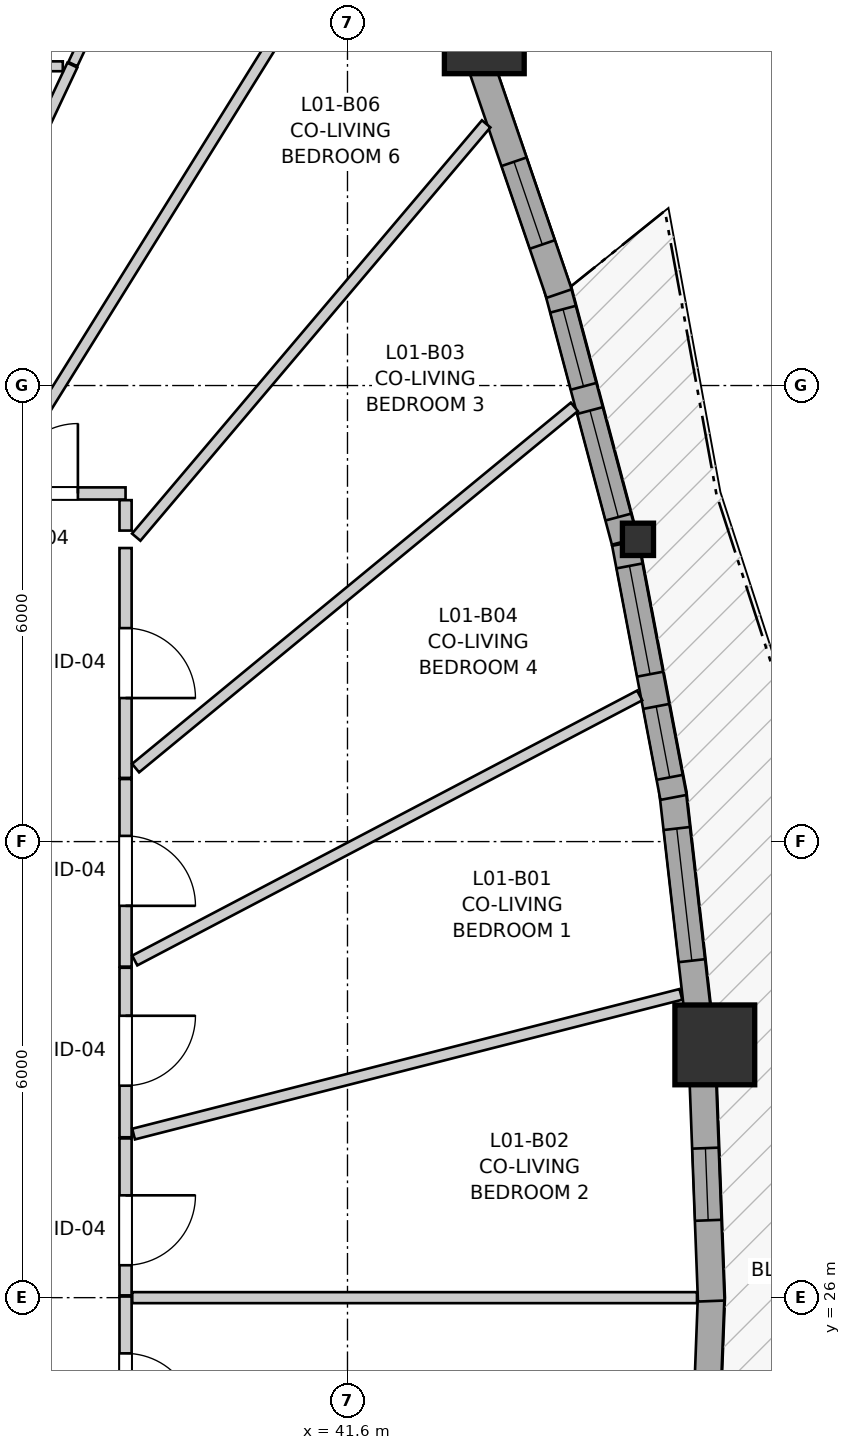
"""IFC4 building model, lengths in metres.
Left out: names, types, materials, properties, quantities, classifications, styles, units other than length and angle.
Written with IfcOpenShell. Run it as: python <this file> out.ifc"""

import sys

from ifc_helpers import new_model, si_unit, direction, frame, frame_2d, origin, origin_2d, place, context, subcontext, project, spatial, rectangle, i_section, extrude, source, transform, mapped, element, fill, save


model = new_model("IFC4")
c1 = context("Model", 3, precision=1e-05, world=origin(), true_north=direction((0.0, 1.0)))
c2 = subcontext(c1, "Body", "Model", "MODEL_VIEW")
j1 = project(units=[si_unit("LENGTHUNIT", "METRE"), si_unit("PLANEANGLEUNIT", "RADIAN")], contexts=[c1])
p1 = place(None, origin())
s1 = spatial("IfcSite", under=j1, at=p1, CompositionType="ELEMENT")
p2 = place(p1, origin())
s2 = spatial("IfcBuilding", under=s1, at=p2, CompositionType="ELEMENT")
p3 = place(p2, frame((0.0, 0.0, 7.8)))
s3 = spatial("IfcBuildingStorey", under=s2, at=p3, CompositionType="ELEMENT", Elevation=7.8)
m1 = source(origin(), c2, "Body", "SweptSolid", [
    extrude(rectangle(XDim=1.05, YDim=1.05, at=origin_2d()), origin(), (0.0, 0.0, 1.0), 2.94),
])
p4 = place(p3, frame((46.433, 29.325, 0.0), z_axis=(0.0, 0.0, 1.0), x_axis=(1.0, 0.0, 0.0)))
e1 = element("IfcColumn", 1, at=p4, inside=s3, PredefinedType="COLUMN", context=c2, shape_type="MappedRepresentation", body=[
    mapped(m1, transform((0.0, 0.0, 0.0), x_axis=(1.0, 0.0, 0.0), y_axis=(0.0, 1.0, 0.0), z_axis=(0.0, 0.0, 1.0), scale=1.0)),
])
m2 = source(origin(), c2, "Body", "SweptSolid", [
    extrude(i_section(OverallWidth=0.409, OverallDepth=0.425, WebThickness=0.03, FlangeThickness=0.048, FilletRadius=0.015, at=origin_2d()), origin(), (0.0, 0.0, 1.0), 2.94),
])
p5 = place(p3, frame((45.422, 35.977, 0.0), z_axis=(0.0, 0.0, 1.0), x_axis=(1.0, 0.0, 0.0)))
e2 = element("IfcColumn", 2, at=p5, inside=s3, PredefinedType="PILASTER", context=c2, shape_type="MappedRepresentation", body=[
    mapped(m2, transform((0.0, 0.0, 0.0), x_axis=(1.0, 0.0, 0.0), y_axis=(0.0, 1.0, 0.0), z_axis=(0.0, 0.0, 1.0), scale=1.0)),
])
p6 = place(p3, frame((43.4, 42.628, 0.0), z_axis=(0.0, 0.0, 1.0), x_axis=(1.0, 0.0, 0.0)))
e3 = element("IfcColumn", 3, at=p6, inside=s3, PredefinedType="COLUMN", context=c2, shape_type="MappedRepresentation", body=[
    mapped(m1, transform((0.0, 0.0, 0.0), x_axis=(1.0, 0.0, 0.0), y_axis=(0.0, 1.0, 0.0), z_axis=(0.0, 0.0, 1.0), scale=1.0)),
])
p7 = place(p3, frame((46.259, 22.701, 0.0), z_axis=(0.0, 0.0, 1.0), x_axis=(0.038015581842, 0.99927714651, 0.0)))
e4 = element("IfcWall", 4, at=p7, inside=s3, PredefinedType="SOLIDWALL", context=c2, shape_type="SweptSolid", body=[
    extrude(rectangle(XDim=3.346, YDim=0.35, at=frame_2d((1.673, 0.0))), origin(), (0.0, 0.0, 1.0), 2.42),
])
p8 = place(p7, frame((1.038, 0.0, 0.82)))
e5 = element("IfcOpeningElement", 5, at=p8, cuts=e4, PredefinedType="OPENING", context=c2, shape_type="SweptSolid", body=[
    extrude(rectangle(XDim=1.25, YDim=1.35, at=frame_2d((0.625, 0.675))), frame((0.0, 0.185, 0.0), z_axis=(0.0, -1.0, 0.0), x_axis=(1.0, 0.0, 0.0)), (0.0, 0.0, 1.0), 0.37),
])
p9 = place(p3, frame((46.386, 25.955, 0.0), z_axis=(0.0, 0.0, 1.0), x_axis=(-0.038063081658, 0.99927533834, 0.0)))
e6 = element("IfcWall", 6, at=p9, inside=s3, PredefinedType="SOLIDWALL", context=c2, shape_type="SweptSolid", body=[
    extrude(rectangle(XDim=3.066, YDim=0.35, at=frame_2d((1.533, 0.0))), origin(), (0.0, 0.0, 1.0), 2.42),
])
p10 = place(p9, frame((1.063, 0.0, 0.82)))
e7 = element("IfcOpeningElement", 7, at=p10, cuts=e6, PredefinedType="OPENING", context=c2, shape_type="SweptSolid", body=[
    extrude(rectangle(XDim=0.95, YDim=1.35, at=frame_2d((0.475, 0.675))), frame((0.0, 0.185, 0.0), z_axis=(0.0, -1.0, 0.0), x_axis=(1.0, 0.0, 0.0)), (0.0, 0.0, 1.0), 0.37),
])
p11 = place(p3, frame((46.225, 29.604, 0.0), z_axis=(0.0, 0.0, 1.0), x_axis=(-0.113323399269, 0.993558154905, 0.0)))
e8 = element("IfcWall", 8, at=p11, inside=s3, PredefinedType="SOLIDWALL", context=c2, shape_type="SweptSolid", body=[
    extrude(rectangle(XDim=3.085, YDim=0.35, at=frame_2d((1.542, 0.0))), origin(), (0.0, 0.0, 1.0), 2.42),
])
p12 = place(p11, frame((0.835, 0.0, 0.82)))
e9 = element("IfcOpeningElement", 9, at=p12, cuts=e8, PredefinedType="OPENING", context=c2, shape_type="SweptSolid", body=[
    extrude(rectangle(XDim=1.75, YDim=1.3, at=frame_2d((0.875, 0.65))), frame((0.0, 0.185, 0.0), z_axis=(0.0, -1.0, 0.0), x_axis=(1.0, 0.0, 0.0)), (0.0, 0.0, 1.0), 0.37),
])
p13 = place(p3, frame((45.889, 32.581, 0.0), z_axis=(0.0, 0.0, 1.0), x_axis=(-0.186670339622, 0.98242260983, 0.0)))
e10 = element("IfcWall", 10, at=p13, inside=s3, PredefinedType="SOLIDWALL", context=c2, shape_type="SweptSolid", body=[
    extrude(rectangle(XDim=3.403, YDim=0.35, at=frame_2d((1.702, 0.0))), origin(), (0.0, 0.0, 1.0), 2.42),
])
p14 = place(p13, frame((0.269, 0.0, 0.82)))
e11 = element("IfcOpeningElement", 11, at=p14, cuts=e10, PredefinedType="OPENING", context=c2, shape_type="SweptSolid", body=[
    extrude(rectangle(XDim=0.95, YDim=1.35, at=frame_2d((0.475, 0.675))), frame((0.0, 0.185, 0.0), z_axis=(0.0, -1.0, 0.0), x_axis=(1.0, 0.0, 0.0)), (0.0, 0.0, 1.0), 0.37),
])
p15 = place(p13, frame((1.65, 0.0, 0.82)))
e12 = element("IfcOpeningElement", 12, at=p15, cuts=e10, PredefinedType="OPENING", context=c2, shape_type="SweptSolid", body=[
    extrude(rectangle(XDim=1.45, YDim=1.25, at=frame_2d((0.725, 0.625))), frame((0.0, 0.185, 0.0), z_axis=(0.0, -1.0, 0.0), x_axis=(1.0, 0.0, 0.0)), (0.0, 0.0, 1.0), 0.37),
])
p16 = place(p3, frame((45.248, 35.951, 0.0), z_axis=(0.0, 0.0, 1.0), x_axis=(-0.25703883136, 0.966401075731, 0.0)))
e13 = element("IfcWall", 13, at=p16, inside=s3, PredefinedType="SOLIDWALL", context=c2, shape_type="SweptSolid", body=[
    extrude(rectangle(XDim=3.459, YDim=0.35, at=frame_2d((1.729, 0.0))), origin(), (0.0, 0.0, 1.0), 2.42),
])
p17 = place(p16, frame((0.329, 0.0, 0.82)))
e14 = element("IfcOpeningElement", 14, at=p17, cuts=e13, PredefinedType="OPENING", context=c2, shape_type="SweptSolid", body=[
    extrude(rectangle(XDim=1.45, YDim=1.25, at=frame_2d((0.725, 0.625))), frame((0.0, 0.185, 0.0), z_axis=(0.0, -1.0, 0.0), x_axis=(1.0, 0.0, 0.0)), (0.0, 0.0, 1.0), 0.37),
])
p18 = place(p16, frame((2.109, 0.0, 0.82)))
e15 = element("IfcOpeningElement", 15, at=p18, cuts=e13, PredefinedType="OPENING", context=c2, shape_type="SweptSolid", body=[
    extrude(rectangle(XDim=1.05, YDim=1.45, at=frame_2d((0.525, 0.725))), frame((0.0, 0.185, 0.0), z_axis=(0.0, -1.0, 0.0), x_axis=(1.0, 0.0, 0.0)), (0.0, 0.0, 1.0), 0.37),
])
p19 = place(p3, frame((44.384, 39.21, 0.0), z_axis=(0.0, 0.0, 1.0), x_axis=(-0.323604561993, 0.946192415663, 0.0)))
e16 = element("IfcWall", 16, at=p19, inside=s3, PredefinedType="SOLIDWALL", context=c2, shape_type="SweptSolid", body=[
    extrude(rectangle(XDim=3.252, YDim=0.35, at=frame_2d((1.626, 0.0))), origin(), (0.0, 0.0, 1.0), 2.42),
])
p20 = place(p19, frame((0.683, 0.0, 0.82)))
e17 = element("IfcOpeningElement", 17, at=p20, cuts=e16, PredefinedType="OPENING", context=c2, shape_type="SweptSolid", body=[
    extrude(rectangle(XDim=1.15, YDim=1.2, at=frame_2d((0.575, 0.6))), frame((0.0, 0.185, 0.0), z_axis=(0.0, -1.0, 0.0), x_axis=(1.0, 0.0, 0.0)), (0.0, 0.0, 1.0), 0.37),
])
p21 = place(p3, frame((38.68, 35.862, 0.0), z_axis=(0.0, 0.0, 1.0), x_axis=(0.0, -1.0, 0.0)))
e18 = element("IfcWall", 18, at=p21, inside=s3, PredefinedType="PARTITIONING", context=c2, shape_type="SweptSolid", body=[
    extrude(rectangle(XDim=3.024, YDim=0.16, at=frame_2d((1.512, 0.0))), origin(), (0.0, 0.0, 1.0), 2.94),
])
p22 = place(p21, frame((1.053, 0.0, 0.0)))
e19 = element("IfcOpeningElement", 19, at=p22, cuts=e18, PredefinedType="OPENING", context=c2, shape_type="SweptSolid", body=[
    extrude(rectangle(XDim=0.92, YDim=2.1, at=frame_2d((0.46, 1.05))), frame((0.0, 0.09, 0.0), z_axis=(0.0, -1.0, 0.0), x_axis=(1.0, 0.0, 0.0)), (0.0, 0.0, 1.0), 0.18),
])
p23 = place(p3, frame((38.68, 32.823, 0.0), z_axis=(0.0, 0.0, 1.0), x_axis=(0.0, -1.0, 0.0)))
e20 = element("IfcWall", 20, at=p23, inside=s3, PredefinedType="PARTITIONING", context=c2, shape_type="SweptSolid", body=[
    extrude(rectangle(XDim=2.468, YDim=0.16, at=frame_2d((1.234, 0.0))), origin(), (0.0, 0.0, 1.0), 2.94),
])
p24 = place(p23, frame((0.748, 0.0, 0.0)))
e21 = element("IfcOpeningElement", 21, at=p24, cuts=e20, PredefinedType="OPENING", context=c2, shape_type="SweptSolid", body=[
    extrude(rectangle(XDim=0.92, YDim=2.1, at=frame_2d((0.46, 1.05))), frame((0.0, 0.09, 0.0), z_axis=(0.0, -1.0, 0.0), x_axis=(1.0, 0.0, 0.0)), (0.0, 0.0, 1.0), 0.18),
])
p25 = place(p3, frame((38.68, 26.015, 0.0), z_axis=(0.0, 0.0, 1.0), x_axis=(0.0, -1.0, 0.0)))
e22 = element("IfcWall", 22, at=p25, inside=s3, PredefinedType="PARTITIONING", context=c2, shape_type="SweptSolid", body=[
    extrude(rectangle(XDim=2.37, YDim=0.16, at=frame_2d((1.185, 0.0))), origin(), (0.0, 0.0, 1.0), 2.94),
])
p26 = place(p25, frame((0.748, 0.0, 0.0)))
e23 = element("IfcOpeningElement", 23, at=p26, cuts=e22, PredefinedType="OPENING", context=c2, shape_type="SweptSolid", body=[
    extrude(rectangle(XDim=0.92, YDim=2.1, at=frame_2d((0.46, 1.05))), frame((0.0, 0.09, 0.0), z_axis=(0.0, -1.0, 0.0), x_axis=(1.0, 0.0, 0.0)), (0.0, 0.0, 1.0), 0.18),
])
p27 = place(p3, frame((38.68, 30.34, 0.0), z_axis=(0.0, 0.0, 1.0), x_axis=(0.0, -1.0, 0.0)))
e24 = element("IfcWall", 24, at=p27, inside=s3, PredefinedType="PARTITIONING", context=c2, shape_type="SweptSolid", body=[
    extrude(rectangle(XDim=2.23, YDim=0.16, at=frame_2d((1.115, 0.0))), origin(), (0.0, 0.0, 1.0), 2.94),
])
p28 = place(p27, frame((0.632, 0.0, 0.0)))
e25 = element("IfcOpeningElement", 25, at=p28, cuts=e24, PredefinedType="OPENING", context=c2, shape_type="SweptSolid", body=[
    extrude(rectangle(XDim=0.92, YDim=2.1, at=frame_2d((0.46, 1.05))), frame((0.0, 0.09, 0.0), z_axis=(0.0, -1.0, 0.0), x_axis=(1.0, 0.0, 0.0)), (0.0, 0.0, 1.0), 0.18),
])
p29 = place(p3, frame((38.68, 28.095, 0.0), z_axis=(0.0, 0.0, 1.0), x_axis=(0.0, -1.0, 0.0)))
e26 = element("IfcWall", 26, at=p29, inside=s3, PredefinedType="PARTITIONING", context=c2, shape_type="SweptSolid", body=[
    extrude(rectangle(XDim=2.065, YDim=0.16, at=frame_2d((1.032, 0.0))), origin(), (0.0, 0.0, 1.0), 2.94),
])
p30 = place(p29, frame((0.749, 0.0, 0.0)))
e27 = element("IfcOpeningElement", 27, at=p30, cuts=e26, PredefinedType="OPENING", context=c2, shape_type="SweptSolid", body=[
    extrude(rectangle(XDim=0.92, YDim=2.1, at=frame_2d((0.46, 1.05))), frame((0.0, 0.09, 0.0), z_axis=(0.0, -1.0, 0.0), x_axis=(1.0, 0.0, 0.0)), (0.0, 0.0, 1.0), 0.18),
])
p31 = place(p3, frame((36.913, 36.58, 0.0), z_axis=(0.0, 0.0, 1.0), x_axis=(1.0, 0.0, 0.0)))
e28 = element("IfcWall", 28, at=p31, inside=s3, PredefinedType="PARTITIONING", context=c2, shape_type="SweptSolid", body=[
    extrude(rectangle(XDim=1.767, YDim=0.16, at=frame_2d((0.883, 0.0))), origin(), (0.0, 0.0, 1.0), 2.94),
])
p32 = place(p31, frame((0.22, 0.0, 0.0)))
e29 = element("IfcOpeningElement", 29, at=p32, cuts=e28, PredefinedType="OPENING", context=c2, shape_type="SweptSolid", body=[
    extrude(rectangle(XDim=0.92, YDim=2.1, at=frame_2d((0.46, 1.05))), frame((0.0, 0.09, 0.0), z_axis=(0.0, -1.0, 0.0), x_axis=(1.0, 0.0, 0.0)), (0.0, 0.0, 1.0), 0.18),
])
p33 = place(p3, frame((37.009, 36.705, 0.0), z_axis=(0.0, 0.0, 1.0), x_axis=(0.528183829193, 0.849130050451, 0.0)))
e30 = element("IfcWall", 30, at=p33, inside=s3, PredefinedType="PARTITIONING", context=c2, shape_type="SweptSolid", body=[
    extrude(rectangle(XDim=10.005, YDim=0.145, at=frame_2d((5.003, 0.0))), origin(), (0.0, 0.0, 1.0), 2.94),
])
p34 = place(p3, frame((38.812, 32.967, 0.0), z_axis=(0.0, 0.0, 1.0), x_axis=(0.772048037558, 0.635564180633, 0.0)))
e31 = element("IfcWall", 31, at=p34, inside=s3, PredefinedType="PARTITIONING", context=c2, shape_type="SweptSolid", body=[
    extrude(rectangle(XDim=7.477, YDim=0.145, at=frame_2d((3.739, 0.0))), origin(), (0.0, 0.0, 1.0), 2.94),
])
p35 = place(p3, frame((38.801, 30.435, 0.0), z_axis=(0.0, 0.0, 1.0), x_axis=(0.885428701358, 0.46477523042, 0.0)))
e32 = element("IfcWall", 32, at=p35, inside=s3, PredefinedType="PARTITIONING", context=c2, shape_type="SweptSolid", body=[
    extrude(rectangle(XDim=7.503, YDim=0.145, at=frame_2d((3.751, 0.0))), origin(), (0.0, 0.0, 1.0), 2.94),
])
p36 = place(p3, frame((38.786, 28.152, 0.0), z_axis=(0.0, 0.0, 1.0), x_axis=(0.968940490632, 0.247294006424, 0.0)))
e33 = element("IfcWall", 33, at=p36, inside=s3, PredefinedType="PARTITIONING", context=c2, shape_type="SweptSolid", body=[
    extrude(rectangle(XDim=7.432, YDim=0.145, at=frame_2d((3.716, 0.0))), origin(), (0.0, 0.0, 1.0), 2.94),
])
p37 = place(p3, frame((38.768, 26.0, 0.0), z_axis=(0.0, 0.0, 1.0), x_axis=(1.0, 0.0, 0.0)))
e34 = element("IfcWall", 34, at=p37, inside=s3, PredefinedType="PARTITIONING", context=c2, shape_type="SweptSolid", body=[
    extrude(rectangle(XDim=7.43, YDim=0.145, at=frame_2d((3.715, 0.0))), origin(), (0.0, 0.0, 1.0), 2.94),
])
p38 = place(p3, frame((38.821, 36.005, 0.0), z_axis=(0.0, 0.0, 1.0), x_axis=(0.646174151972, 0.76318999294, 0.0)))
e35 = element("IfcWall", 35, at=p38, inside=s3, PredefinedType="PARTITIONING", context=c2, shape_type="SweptSolid", body=[
    extrude(rectangle(XDim=7.125, YDim=0.145, at=frame_2d((3.562, 0.0))), origin(), (0.0, 0.0, 1.0), 2.94),
])
p39 = place(p3, frame((35.385, 36.698, 0.0), z_axis=(0.0, 0.0, 1.0), x_axis=(0.425687116038, 0.904870421242, 0.0)))
e36 = element("IfcWall", 36, at=p39, inside=s3, PredefinedType="PARTITIONING", context=c2, shape_type="SweptSolid", body=[
    extrude(rectangle(XDim=6.097, YDim=0.145, at=frame_2d((3.049, 0.0))), origin(), (0.0, 0.0, 1.0), 2.94),
])
p40 = place(p3, frame((37.987, 42.229, 0.0), z_axis=(0.0, 0.0, 1.0), x_axis=(0.425771690569, 0.904830629184, 0.0)))
e37 = element("IfcWall", 37, at=p40, inside=s3, PredefinedType="PARTITIONING", context=c2, shape_type="SweptSolid", body=[
    extrude(rectangle(XDim=1.855, YDim=0.13, at=frame_2d((0.928, 0.0))), origin(), (0.0, 0.0, 1.0), 2.94),
])
p41 = place(p3, frame((37.071, 42.2, 0.0), z_axis=(0.0, 0.0, 1.0), x_axis=(1.0, 0.0, 0.0)))
e38 = element("IfcWall", 38, at=p41, inside=s3, PredefinedType="PARTITIONING", context=c2, shape_type="SweptSolid", body=[
    extrude(rectangle(XDim=0.783, YDim=0.13, at=frame_2d((0.392, 0.0))), origin(), (0.0, 0.0, 1.0), 2.94),
])
p42 = place(p3, frame((38.68, 36.092, 0.0), z_axis=(0.0, 0.0, 1.0), x_axis=(0.0, 1.0, 0.0)))
e39 = element("IfcWall", 39, at=p42, inside=s3, PredefinedType="PARTITIONING", context=c2, shape_type="SweptSolid", body=[
    extrude(rectangle(XDim=0.4, YDim=0.16, at=frame_2d((0.2, 0.0))), origin(), (0.0, 0.0, 1.0), 2.94),
])
m3 = source(origin(), c2, "Body", "SweptSolid", [
    extrude(rectangle(XDim=0.95, YDim=1.35, at=frame_2d((0.475, 0.675))), frame((0.0, 0.03, 0.0), z_axis=(0.0, -1.0, 0.0), x_axis=(1.0, 0.0, 0.0)), (0.0, 0.0, 1.0), 0.06),
])
p43 = place(p10, origin())
e40 = element("IfcWindow", 40, at=p43, inside=s3, PartitioningType="SINGLE_PANEL", PredefinedType="WINDOW", context=c2, shape_type="MappedRepresentation", body=[
    mapped(m3, transform((0.0, 0.0, 0.0), x_axis=(1.0, 0.0, 0.0), y_axis=(0.0, 1.0, 0.0), z_axis=(0.0, 0.0, 1.0), scale=1.0)),
])
fill(e7, e40)
m4 = source(origin(), c2, "Body", "SweptSolid", [
    extrude(rectangle(XDim=1.75, YDim=1.3, at=frame_2d((0.875, 0.65))), frame((0.0, 0.03, 0.0), z_axis=(0.0, -1.0, 0.0), x_axis=(1.0, 0.0, 0.0)), (0.0, 0.0, 1.0), 0.06),
])
p44 = place(p12, origin())
e41 = element("IfcWindow", 41, at=p44, inside=s3, PartitioningType="SINGLE_PANEL", PredefinedType="WINDOW", context=c2, shape_type="MappedRepresentation", body=[
    mapped(m4, transform((0.0, 0.0, 0.0), x_axis=(1.0, 0.0, 0.0), y_axis=(0.0, 1.0, 0.0), z_axis=(0.0, 0.0, 1.0), scale=1.0)),
])
fill(e9, e41)
p45 = place(p14, origin())
e42 = element("IfcWindow", 42, at=p45, inside=s3, PartitioningType="SINGLE_PANEL", PredefinedType="WINDOW", context=c2, shape_type="MappedRepresentation", body=[
    mapped(m3, transform((0.0, 0.0, 0.0), x_axis=(1.0, 0.0, 0.0), y_axis=(0.0, 1.0, 0.0), z_axis=(0.0, 0.0, 1.0), scale=1.0)),
])
fill(e11, e42)
m5 = source(origin(), c2, "Body", "SweptSolid", [
    extrude(rectangle(XDim=1.45, YDim=1.25, at=frame_2d((0.725, 0.625))), frame((0.0, 0.03, 0.0), z_axis=(0.0, -1.0, 0.0), x_axis=(1.0, 0.0, 0.0)), (0.0, 0.0, 1.0), 0.06),
])
p46 = place(p15, origin())
e43 = element("IfcWindow", 43, at=p46, inside=s3, PartitioningType="SINGLE_PANEL", PredefinedType="WINDOW", context=c2, shape_type="MappedRepresentation", body=[
    mapped(m5, transform((0.0, 0.0, 0.0), x_axis=(1.0, 0.0, 0.0), y_axis=(0.0, 1.0, 0.0), z_axis=(0.0, 0.0, 1.0), scale=1.0)),
])
fill(e12, e43)
p47 = place(p17, origin())
e44 = element("IfcWindow", 44, at=p47, inside=s3, PartitioningType="SINGLE_PANEL", PredefinedType="WINDOW", context=c2, shape_type="MappedRepresentation", body=[
    mapped(m5, transform((0.0, 0.0, 0.0), x_axis=(1.0, 0.0, 0.0), y_axis=(0.0, 1.0, 0.0), z_axis=(0.0, 0.0, 1.0), scale=1.0)),
])
fill(e14, e44)
m6 = source(origin(), c2, "Body", "SweptSolid", [
    extrude(rectangle(XDim=1.05, YDim=1.45, at=frame_2d((0.525, 0.725))), frame((0.0, 0.03, 0.0), z_axis=(0.0, -1.0, 0.0), x_axis=(1.0, 0.0, 0.0)), (0.0, 0.0, 1.0), 0.06),
])
p48 = place(p18, origin())
e45 = element("IfcWindow", 45, at=p48, inside=s3, PartitioningType="SINGLE_PANEL", PredefinedType="WINDOW", context=c2, shape_type="MappedRepresentation", body=[
    mapped(m6, transform((0.0, 0.0, 0.0), x_axis=(1.0, 0.0, 0.0), y_axis=(0.0, 1.0, 0.0), z_axis=(0.0, 0.0, 1.0), scale=1.0)),
])
fill(e15, e45)
m7 = source(origin(), c2, "Body", "SweptSolid", [
    extrude(rectangle(XDim=1.15, YDim=1.2, at=frame_2d((0.575, 0.6))), frame((0.0, 0.03, 0.0), z_axis=(0.0, -1.0, 0.0), x_axis=(1.0, 0.0, 0.0)), (0.0, 0.0, 1.0), 0.06),
])
p49 = place(p20, origin())
e46 = element("IfcWindow", 46, at=p49, inside=s3, PartitioningType="SINGLE_PANEL", PredefinedType="WINDOW", context=c2, shape_type="MappedRepresentation", body=[
    mapped(m7, transform((0.0, 0.0, 0.0), x_axis=(1.0, 0.0, 0.0), y_axis=(0.0, 1.0, 0.0), z_axis=(0.0, 0.0, 1.0), scale=1.0)),
])
fill(e17, e46)
m8 = source(origin(), c2, "Body", "SweptSolid", [
    extrude(rectangle(XDim=0.92, YDim=2.1, at=frame_2d((0.46, 1.05))), frame((0.0, 0.025, 0.0), z_axis=(0.0, -1.0, 0.0), x_axis=(1.0, 0.0, 0.0)), (0.0, 0.0, 1.0), 0.05),
])
p50 = place(p22, origin())
e47 = element("IfcDoor", 47, at=p50, inside=s3, OperationType="SINGLE_SWING_RIGHT", PredefinedType="DOOR", context=c2, shape_type="MappedRepresentation", body=[
    mapped(m8, transform((0.0, 0.0, 0.0), x_axis=(1.0, 0.0, 0.0), y_axis=(0.0, 1.0, 0.0), z_axis=(0.0, 0.0, 1.0), scale=1.0)),
])
fill(e19, e47)
p51 = place(p24, origin())
e48 = element("IfcDoor", 48, at=p51, inside=s3, OperationType="SINGLE_SWING_RIGHT", PredefinedType="DOOR", context=c2, shape_type="MappedRepresentation", body=[
    mapped(m8, transform((0.0, 0.0, 0.0), x_axis=(1.0, 0.0, 0.0), y_axis=(0.0, 1.0, 0.0), z_axis=(0.0, 0.0, 1.0), scale=1.0)),
])
fill(e21, e48)
p52 = place(p26, origin())
e49 = element("IfcDoor", 49, at=p52, inside=s3, OperationType="SINGLE_SWING_RIGHT", PredefinedType="DOOR", context=c2, shape_type="MappedRepresentation", body=[
    mapped(m8, transform((0.0, 0.0, 0.0), x_axis=(1.0, 0.0, 0.0), y_axis=(0.0, 1.0, 0.0), z_axis=(0.0, 0.0, 1.0), scale=1.0)),
])
fill(e23, e49)
p53 = place(p28, origin())
e50 = element("IfcDoor", 50, at=p53, inside=s3, OperationType="SINGLE_SWING_LEFT", PredefinedType="DOOR", context=c2, shape_type="MappedRepresentation", body=[
    mapped(m8, transform((0.0, 0.0, 0.0), x_axis=(1.0, 0.0, 0.0), y_axis=(0.0, 1.0, 0.0), z_axis=(0.0, 0.0, 1.0), scale=1.0)),
])
fill(e25, e50)
p54 = place(p30, origin())
e51 = element("IfcDoor", 51, at=p54, inside=s3, OperationType="SINGLE_SWING_LEFT", PredefinedType="DOOR", context=c2, shape_type="MappedRepresentation", body=[
    mapped(m8, transform((0.0, 0.0, 0.0), x_axis=(1.0, 0.0, 0.0), y_axis=(0.0, 1.0, 0.0), z_axis=(0.0, 0.0, 1.0), scale=1.0)),
])
fill(e27, e51)
p55 = place(p32, origin())
e52 = element("IfcDoor", 52, at=p55, inside=s3, OperationType="SINGLE_SWING_RIGHT", PredefinedType="DOOR", context=c2, shape_type="MappedRepresentation", body=[
    mapped(m8, transform((0.0, 0.0, 0.0), x_axis=(1.0, 0.0, 0.0), y_axis=(0.0, 1.0, 0.0), z_axis=(0.0, 0.0, 1.0), scale=1.0)),
])
fill(e29, e52)
save(model, sys.argv[1])
